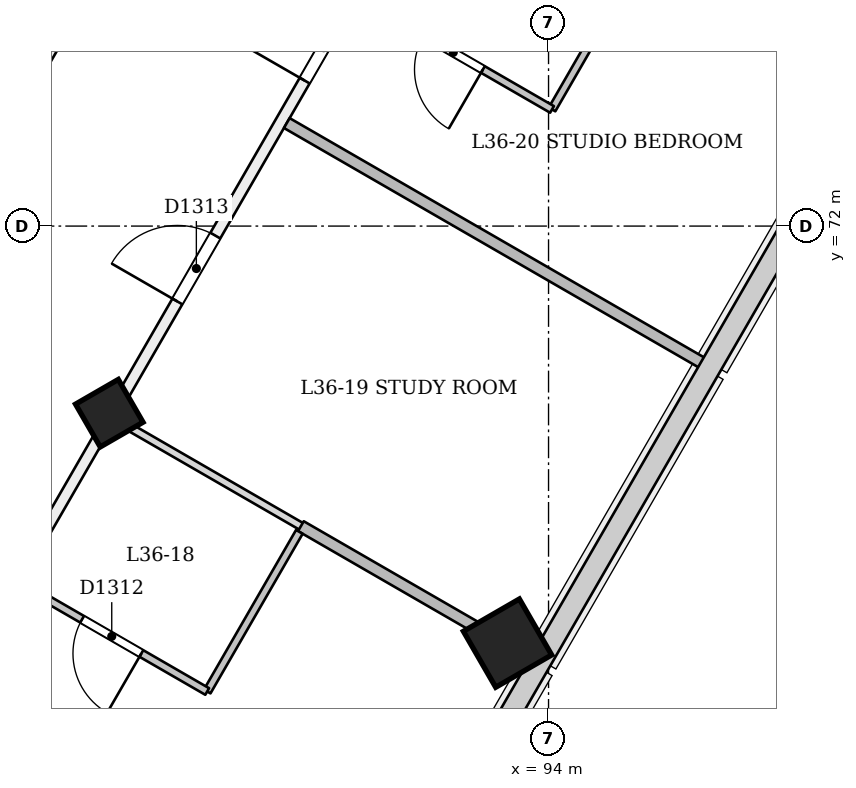
"""IFC4 building model, lengths in metres.
Left out: names, types, materials, properties, quantities, classifications, styles, units other than length and angle.
Written with IfcOpenShell. Run it as: python <this file> out.ifc"""

import sys

from ifc_helpers import new_model, si_unit, direction, frame, frame_2d, origin, origin_2d, place, context, subcontext, project, spatial, rectangle, extrude, element, fill, save


model = new_model("IFC4")
c1 = context("Model", 3, precision=1e-05, world=origin(), true_north=direction((0.0, 1.0)))
c2 = subcontext(c1, "Body", "Model", "MODEL_VIEW")
j1 = project(units=[si_unit("LENGTHUNIT", "METRE"), si_unit("PLANEANGLEUNIT", "RADIAN")], contexts=[c1])
p1 = place(None, origin())
s1 = spatial("IfcSite", under=j1, at=p1, CompositionType="ELEMENT")
p2 = place(p1, origin())
s2 = spatial("IfcBuilding", under=s1, at=p2, CompositionType="ELEMENT")
p3 = place(p2, frame((0.0, 0.0, 142.2)))
s3 = spatial("IfcBuildingStorey", under=s2, at=p3, CompositionType="ELEMENT", Elevation=142.2)
p4 = place(p3, frame((88.248, 69.491, -0.02), z_axis=(-0.02215369191, 0.038413282303, 0.999016333038), x_axis=(-0.500657411499, -0.865361524829, 0.022171776144)))
e1 = element("IfcColumn", 1, at=p4, inside=s3, PredefinedType="COLUMN", context=c2, shape_type="SweptSolid", body=[
    extrude(rectangle(XDim=0.65, YDim=0.65, at=origin_2d()), origin(), (0.0, 0.0, 1.0), 3.604),
])
p5 = place(p3, frame((93.488, 66.466, -0.026), z_axis=(-0.022222852987, 0.038483477124, 0.999012095419), x_axis=(-0.500174626395, -0.865639439229, 0.022219459073)))
e2 = element("IfcColumn", 2, at=p5, inside=s3, PredefinedType="COLUMN", context=c2, shape_type="SweptSolid", body=[
    extrude(rectangle(XDim=0.85, YDim=0.85, at=origin_2d()), origin(), (0.0, 0.0, 1.0), 3.604),
])
p6 = place(p3, frame((96.622, 90.199, 0.0), z_axis=(0.0, 0.0, 1.0), x_axis=(-0.49999793811, -0.866026594214, 0.0)))
e3 = element("IfcWall", 3, at=p6, inside=s3, PredefinedType="PARTITIONING", context=c2, shape_type="SweptSolid", body=[
    extrude(rectangle(XDim=23.244, YDim=0.15, at=frame_2d((11.622, 0.0))), origin(), (0.0, 0.0, 1.0), 3.15),
])
p7 = place(p6, frame((4.621, 0.0, 0.0)))
e4 = element("IfcOpeningElement", 4, at=p7, cuts=e3, PredefinedType="OPENING", context=c2, shape_type="SweptSolid", body=[
    extrude(rectangle(XDim=1.0, YDim=2.1, at=frame_2d((0.5, 1.05))), frame((0.0, 0.085, 0.0), z_axis=(0.0, -1.0, 0.0), x_axis=(1.0, 0.0, 0.0)), (0.0, 0.0, 1.0), 0.171),
])
p8 = place(p6, frame((10.348, 0.0, 0.0)))
e5 = element("IfcOpeningElement", 5, at=p8, cuts=e3, PredefinedType="OPENING", context=c2, shape_type="SweptSolid", body=[
    extrude(rectangle(XDim=1.2, YDim=2.1, at=frame_2d((0.6, 1.05))), frame((0.0, 0.085, 0.0), z_axis=(0.0, -1.0, 0.0), x_axis=(1.0, 0.0, 0.0)), (0.0, 0.0, 1.0), 0.171),
])
p9 = place(p6, frame((15.389, 0.0, 0.0)))
e6 = element("IfcOpeningElement", 6, at=p9, cuts=e3, PredefinedType="OPENING", context=c2, shape_type="SweptSolid", body=[
    extrude(rectangle(XDim=1.0, YDim=2.1, at=frame_2d((0.5, 1.05))), frame((0.0, 0.085, 0.0), z_axis=(0.0, -1.0, 0.0), x_axis=(1.0, 0.0, 0.0)), (0.0, 0.0, 1.0), 0.171),
])
p10 = place(p6, frame((19.423, 0.0, 0.0)))
e7 = element("IfcOpeningElement", 7, at=p10, cuts=e3, PredefinedType="OPENING", context=c2, shape_type="SweptSolid", body=[
    extrude(rectangle(XDim=1.0, YDim=2.1, at=frame_2d((0.5, 1.05))), frame((0.0, 0.085, 0.0), z_axis=(0.0, -1.0, 0.0), x_axis=(1.0, 0.0, 0.0)), (0.0, 0.0, 1.0), 0.171),
])
p11 = place(p3, frame((85.065, 63.98, 0.0), z_axis=(0.0, 0.0, 1.0), x_axis=(0.499427357949, 0.866355766491, 0.0)))
e8 = element("IfcWall", 8, at=p11, inside=s3, PredefinedType="PARTITIONING", context=c2, shape_type="SweptSolid", body=[
    extrude(rectangle(XDim=41.02, YDim=0.15, at=frame_2d((20.51, 0.0))), origin(), (0.0, 0.0, 1.0), 2.75),
])
p12 = place(p11, frame((0.382, 0.0, 0.0)))
e9 = element("IfcOpeningElement", 9, at=p12, cuts=e8, PredefinedType="OPENING", context=c2, shape_type="SweptSolid", body=[
    extrude(rectangle(XDim=1.2, YDim=2.1, at=frame_2d((0.6, 1.05))), frame((0.0, 0.085, 0.0), z_axis=(0.0, -1.0, 0.0), x_axis=(1.0, 0.0, 0.0)), (0.0, 0.0, 1.0), 0.171),
])
p13 = place(p11, frame((2.583, 0.0, 0.0)))
e10 = element("IfcOpeningElement", 10, at=p13, cuts=e8, PredefinedType="OPENING", context=c2, shape_type="SweptSolid", body=[
    extrude(rectangle(XDim=1.0, YDim=2.1, at=frame_2d((0.5, 1.05))), frame((0.0, 0.085, 0.0), z_axis=(0.0, -1.0, 0.0), x_axis=(1.0, 0.0, 0.0)), (0.0, 0.0, 1.0), 0.171),
])
p14 = place(p11, frame((8.113, 0.0, 0.0)))
e11 = element("IfcOpeningElement", 11, at=p14, cuts=e8, PredefinedType="OPENING", context=c2, shape_type="SweptSolid", body=[
    extrude(rectangle(XDim=1.0, YDim=2.1, at=frame_2d((0.5, 1.05))), frame((0.0, 0.085, 0.0), z_axis=(0.0, -1.0, 0.0), x_axis=(1.0, 0.0, 0.0)), (0.0, 0.0, 1.0), 0.171),
])
p15 = place(p11, frame((11.467, 0.0, 0.0)))
e12 = element("IfcOpeningElement", 12, at=p15, cuts=e8, PredefinedType="OPENING", context=c2, shape_type="SweptSolid", body=[
    extrude(rectangle(XDim=1.0, YDim=2.1, at=frame_2d((0.5, 1.05))), frame((0.0, 0.085, 0.0), z_axis=(0.0, -1.0, 0.0), x_axis=(1.0, 0.0, 0.0)), (0.0, 0.0, 1.0), 0.171),
])
p16 = place(p11, frame((18.142, 0.0, 0.0)))
e13 = element("IfcOpeningElement", 13, at=p16, cuts=e8, PredefinedType="OPENING", context=c2, shape_type="SweptSolid", body=[
    extrude(rectangle(XDim=1.0, YDim=2.1, at=frame_2d((0.5, 1.05))), frame((0.0, 0.085, 0.0), z_axis=(0.0, -1.0, 0.0), x_axis=(1.0, 0.0, 0.0)), (0.0, 0.0, 1.0), 0.171),
])
p17 = place(p11, frame((20.583, 0.0, 0.0)))
e14 = element("IfcOpeningElement", 14, at=p17, cuts=e8, PredefinedType="OPENING", context=c2, shape_type="SweptSolid", body=[
    extrude(rectangle(XDim=1.0, YDim=2.1, at=frame_2d((0.5, 1.05))), frame((0.0, 0.085, 0.0), z_axis=(0.0, -1.0, 0.0), x_axis=(1.0, 0.0, 0.0)), (0.0, 0.0, 1.0), 0.171),
])
p18 = place(p11, frame((26.113, 0.0, 0.0)))
e15 = element("IfcOpeningElement", 15, at=p18, cuts=e8, PredefinedType="OPENING", context=c2, shape_type="SweptSolid", body=[
    extrude(rectangle(XDim=1.0, YDim=2.1, at=frame_2d((0.5, 1.05))), frame((0.0, 0.085, 0.0), z_axis=(0.0, -1.0, 0.0), x_axis=(1.0, 0.0, 0.0)), (0.0, 0.0, 1.0), 0.171),
])
p19 = place(p11, frame((33.863, 0.0, 0.0)))
e16 = element("IfcOpeningElement", 16, at=p19, cuts=e8, PredefinedType="OPENING", context=c2, shape_type="SweptSolid", body=[
    extrude(rectangle(XDim=1.2, YDim=2.1, at=frame_2d((0.6, 1.05))), frame((0.0, 0.085, 0.0), z_axis=(0.0, -1.0, 0.0), x_axis=(1.0, 0.0, 0.0)), (0.0, 0.0, 1.0), 0.171),
])
p20 = place(p11, frame((39.545, 0.0, 0.0)))
e17 = element("IfcOpeningElement", 17, at=p20, cuts=e8, PredefinedType="OPENING", context=c2, shape_type="SweptSolid", body=[
    extrude(rectangle(XDim=1.2, YDim=2.1, at=frame_2d((0.6, 1.05))), frame((0.0, 0.085, 0.0), z_axis=(0.0, -1.0, 0.0), x_axis=(1.0, 0.0, 0.0)), (0.0, 0.0, 1.0), 0.171),
])
p21 = place(p3, frame((90.722, 67.977, 0.0), z_axis=(0.0, 0.0, 1.0), x_axis=(-0.499928696113, -0.866066567189, 0.0)))
e18 = element("IfcWall", 18, at=p21, inside=s3, PredefinedType="PARTITIONING", context=c2, shape_type="SweptSolid", body=[
    extrude(rectangle(XDim=2.425, YDim=0.1, at=frame_2d((1.212, 0.0))), origin(), (0.0, 0.0, 1.0), 2.75),
])
p22 = place(p3, frame((89.509, 65.877, 0.0), z_axis=(0.0, 0.0, 1.0), x_axis=(-0.866040377869, 0.499974063228, 0.0)))
e19 = element("IfcWall", 19, at=p22, inside=s3, PredefinedType="PARTITIONING", context=c2, shape_type="SweptSolid", body=[
    extrude(rectangle(XDim=2.828, YDim=0.1, at=frame_2d((1.414, 0.0))), origin(), (0.0, 0.0, 1.0), 3.15),
])
p23 = place(p22, frame((1.0, 0.0, 0.0)))
e20 = element("IfcOpeningElement", 20, at=p23, cuts=e19, PredefinedType="OPENING", context=c2, shape_type="SweptSolid", body=[
    extrude(rectangle(XDim=0.9, YDim=2.1, at=frame_2d((0.45, 1.05))), frame((0.0, 0.061, 0.0), z_axis=(0.0, -1.0, 0.0), x_axis=(1.0, 0.0, 0.0)), (0.0, 0.0, 1.0), 0.121),
])
p24 = place(p3, frame((93.79, 66.292, 0.0), z_axis=(0.0, 0.0, 1.0), x_axis=(-0.866019260715, 0.500010639957, 0.0)))
e21 = element("IfcWall", 21, at=p24, inside=s3, PredefinedType="PARTITIONING", context=c2, shape_type="SweptSolid", body=[
    extrude(rectangle(XDim=3.52, YDim=0.15, at=frame_2d((1.76, 0.0))), origin(), (0.0, 0.0, 1.0), 2.65),
])
p25 = place(p3, frame((90.777, 68.032, 0.0), z_axis=(0.0, 0.0, 1.0), x_axis=(-0.866035761792, 0.499982058975, 0.0)))
e22 = element("IfcWall", 22, at=p25, inside=s3, PredefinedType="PARTITIONING", context=c2, shape_type="SweptSolid", body=[
    extrude(rectangle(XDim=2.849, YDim=0.1, at=frame_2d((1.425, 0.0))), origin(), (0.0, 0.0, 1.0), 2.75),
])
p26 = place(p3, frame((96.058, 70.179, 0.0), z_axis=(0.0, 0.0, 1.0), x_axis=(-0.866025586274, 0.499999683919, 0.0)))
e23 = element("IfcWall", 23, at=p26, inside=s3, PredefinedType="PARTITIONING", context=c2, shape_type="SweptSolid", body=[
    extrude(rectangle(XDim=6.353, YDim=0.15, at=frame_2d((3.176, 0.0))), origin(), (0.0, 0.0, 1.0), 2.65),
])
p27 = place(p3, frame((95.308, 75.721, 0.0), z_axis=(0.0, 0.0, 1.0), x_axis=(-0.499976333282, -0.866039067339, 0.0)))
e24 = element("IfcWall", 24, at=p27, inside=s3, PredefinedType="PARTITIONING", context=c2, shape_type="SweptSolid", body=[
    extrude(rectangle(XDim=2.525, YDim=0.1, at=frame_2d((1.262, 0.0))), origin(), (0.0, 0.0, 1.0), 2.75),
])
p28 = place(p3, frame((94.046, 73.535, 0.0), z_axis=(0.0, 0.0, 1.0), x_axis=(-0.866022048785, 0.500005810984, 0.0)))
e25 = element("IfcWall", 25, at=p28, inside=s3, PredefinedType="PARTITIONING", context=c2, shape_type="SweptSolid", body=[
    extrude(rectangle(XDim=2.934, YDim=0.1, at=frame_2d((1.467, 0.0))), origin(), (0.0, 0.0, 1.0), 3.15),
])
p29 = place(p28, frame((1.05, 0.0, 0.0)))
e26 = element("IfcOpeningElement", 26, at=p29, cuts=e25, PredefinedType="OPENING", context=c2, shape_type="SweptSolid", body=[
    extrude(rectangle(XDim=0.9, YDim=2.1, at=frame_2d((0.45, 1.05))), frame((0.0, 0.061, 0.0), z_axis=(0.0, -1.0, 0.0), x_axis=(1.0, 0.0, 0.0)), (0.0, 0.0, 1.0), 0.121),
])
p30 = place(p3, frame((98.29, 74.086, 0.0), z_axis=(0.0, 0.0, 1.0), x_axis=(-0.866038183914, 0.499977863513, 0.0)))
e27 = element("IfcWall", 27, at=p30, inside=s3, PredefinedType="PARTITIONING", context=c2, shape_type="SweptSolid", body=[
    extrude(rectangle(XDim=3.42, YDim=0.15, at=frame_2d((1.71, 0.0))), origin(), (0.0, 0.0, 1.0), 2.65),
])
p31 = place(p23, origin())
e28 = element("IfcDoor", 28, at=p31, inside=s3, OperationType="SINGLE_SWING_LEFT", PredefinedType="NOTDEFINED", context=c2, shape_type="SweptSolid", body=[
    extrude(rectangle(XDim=0.9, YDim=2.1, at=frame_2d((0.45, 1.05))), frame((0.0, 0.025, 0.0), z_axis=(0.0, -1.0, 0.0), x_axis=(1.0, 0.0, 0.0)), (0.0, 0.0, 1.0), 0.05),
])
fill(e20, e28)
p32 = place(p14, origin())
e29 = element("IfcDoor", 29, at=p32, inside=s3, OperationType="SINGLE_SWING_LEFT", PredefinedType="NOTDEFINED", context=c2, shape_type="SweptSolid", body=[
    extrude(rectangle(XDim=1.0, YDim=2.1, at=frame_2d((0.5, 1.05))), frame((0.0, 0.025, 0.0), z_axis=(0.0, -1.0, 0.0), x_axis=(1.0, 0.0, 0.0)), (0.0, 0.0, 1.0), 0.05),
])
fill(e11, e29)
p33 = place(p15, origin())
e30 = element("IfcDoor", 30, at=p33, inside=s3, OperationType="SINGLE_SWING_LEFT", PredefinedType="NOTDEFINED", context=c2, shape_type="SweptSolid", body=[
    extrude(rectangle(XDim=1.0, YDim=2.1, at=frame_2d((0.5, 1.05))), frame((0.0, 0.025, 0.0), z_axis=(0.0, -1.0, 0.0), x_axis=(1.0, 0.0, 0.0)), (0.0, 0.0, 1.0), 0.05),
])
fill(e12, e30)
p34 = place(p29, origin())
e31 = element("IfcDoor", 31, at=p34, inside=s3, OperationType="SINGLE_SWING_LEFT", PredefinedType="NOTDEFINED", context=c2, shape_type="SweptSolid", body=[
    extrude(rectangle(XDim=0.9, YDim=2.1, at=frame_2d((0.45, 1.05))), frame((0.0, 0.025, 0.0), z_axis=(0.0, -1.0, 0.0), x_axis=(1.0, 0.0, 0.0)), (0.0, 0.0, 1.0), 0.05),
])
fill(e26, e31)
save(model, sys.argv[1])
